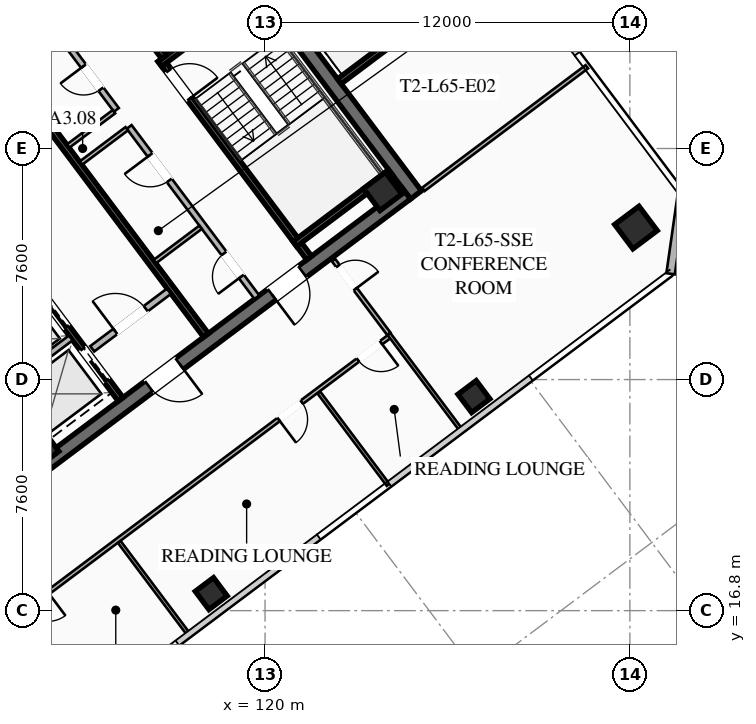
"""IFC4 building model, lengths in metres.
Left out: names, types, materials, properties, quantities, classifications, styles, units other than length and angle.
Written with IfcOpenShell. Run it as: python <this file> out.ifc"""

import sys

from ifc_helpers import new_model, si_unit, direction, frame, frame_2d, origin, origin_2d, place, context, subcontext, project, spatial, rectangle, hollow_rectangle, extrude, element, fill, save


model = new_model("IFC4")
c1 = context("Model", 3, precision=1e-05, world=origin(), true_north=direction((0.0, 1.0)))
c2 = subcontext(c1, "Body", "Model", "MODEL_VIEW")
j1 = project(units=[si_unit("LENGTHUNIT", "METRE"), si_unit("PLANEANGLEUNIT", "RADIAN")], contexts=[c1])
p1 = place(None, origin())
s1 = spatial("IfcSite", under=j1, at=p1, CompositionType="ELEMENT")
p2 = place(p1, origin())
s2 = spatial("IfcBuilding", under=s1, at=p2, CompositionType="ELEMENT")
p3 = place(p2, frame((0.0, 0.0, 239.7)))
s3 = spatial("IfcBuildingStorey", under=s2, at=p3, CompositionType="ELEMENT", Elevation=239.7)
p4 = place(p3, frame((115.604, 42.953, 0.0), z_axis=(0.0, 0.0, 1.0), x_axis=(0.600005007985, -0.799996243986, 0.0)))
e1 = element("IfcWall", 1, at=p4, inside=s3, PredefinedType="SHEAR", context=c2, shape_type="SweptSolid", body=[
    extrude(rectangle(XDim=15.6, YDim=0.45, at=frame_2d((7.8, 0.0))), origin(), (0.0, 0.0, 1.0), 3.55),
])
p5 = place(p3, frame((124.649, 30.518, 0.0), z_axis=(0.0, 0.0, 1.0), x_axis=(-0.8, -0.6, 0.0)))
e2 = element("IfcWall", 2, at=p5, inside=s3, PredefinedType="SHEAR", context=c2, shape_type="SweptSolid", body=[
    extrude(rectangle(XDim=15.26, YDim=0.45, at=frame_2d((7.63, 0.0))), origin(), (0.0, 0.0, 1.0), 3.55),
])
p6 = place(p5, frame((9.33, 0.0, 0.0)))
e3 = element("IfcOpeningElement", 3, at=p6, cuts=e2, PredefinedType="OPENING", context=c2, shape_type="SweptSolid", body=[
    extrude(rectangle(XDim=1.25, YDim=2.25, at=frame_2d((0.625, 1.125))), frame((0.0, 0.235, 0.0), z_axis=(0.0, -1.0, 0.0), x_axis=(1.0, 0.0, 0.0)), (0.0, 0.0, 1.0), 0.47),
])
p7 = place(p5, frame((4.28, 0.0, 0.0)))
e4 = element("IfcOpeningElement", 4, at=p7, cuts=e2, PredefinedType="OPENING", context=c2, shape_type="SweptSolid", body=[
    extrude(rectangle(XDim=1.25, YDim=2.25, at=frame_2d((0.625, 1.125))), frame((0.0, 0.235, 0.0), z_axis=(0.0, -1.0, 0.0), x_axis=(1.0, 0.0, 0.0)), (0.0, 0.0, 1.0), 0.47),
])
p8 = place(p3, frame((103.351, 33.482, 0.0), z_axis=(0.0, 0.0, 1.0), x_axis=(0.8, 0.6, 0.0)))
e5 = element("IfcWall", 5, at=p8, inside=s3, PredefinedType="SHEAR", context=c2, shape_type="SweptSolid", body=[
    extrude(rectangle(XDim=15.26, YDim=0.45, at=frame_2d((7.63, 0.0))), origin(), (0.0, 0.0, 1.0), 3.55),
])
p9 = place(p8, frame((4.68, 0.0, 0.0)))
e6 = element("IfcOpeningElement", 6, at=p9, cuts=e5, PredefinedType="OPENING", context=c2, shape_type="SweptSolid", body=[
    extrude(rectangle(XDim=1.25, YDim=2.25, at=frame_2d((0.625, 1.125))), frame((0.0, 0.235, 0.0), z_axis=(0.0, -1.0, 0.0), x_axis=(1.0, 0.0, 0.0)), (0.0, 0.0, 1.0), 0.47),
])
p10 = place(p8, frame((9.73, 0.0, 0.0)))
e7 = element("IfcOpeningElement", 7, at=p10, cuts=e5, PredefinedType="OPENING", context=c2, shape_type="SweptSolid", body=[
    extrude(rectangle(XDim=1.25, YDim=2.25, at=frame_2d((0.625, 1.125))), frame((0.0, 0.235, 0.0), z_axis=(0.0, -1.0, 0.0), x_axis=(1.0, 0.0, 0.0)), (0.0, 0.0, 1.0), 0.47),
])
for number, where, z_axis, x_axis in (
    (8, (112.59, 22.13, 0.0), (0.0, 0.0, 1.0), (0.8, 0.6, 0.0)),
    (9, (123.87, 30.59, 0.0), (0.0, 0.0, 1.0), (0.8, 0.6, 0.0)),
):
    element("IfcColumn", number, at=place(p3, frame(where, z_axis=z_axis, x_axis=x_axis)), inside=s3, PredefinedType="COLUMN", context=c2, shape_type="SweptSolid", body=[
        extrude(hollow_rectangle(XDim=0.9, YDim=0.9, WallThickness=0.04, at=origin_2d()), origin(), (0.0, 0.0, 1.0), 3.37),
    ])
p11 = place(p3, frame((132.2, 29.4, 0.0), z_axis=(0.0, 0.0, 1.0), x_axis=(0.799999996291, 0.600000004945, 0.0)))
e10 = element("IfcColumn", 10, at=p11, inside=s3, PredefinedType="COLUMN", context=c2, shape_type="SweptSolid", body=[
    extrude(hollow_rectangle(XDim=1.0, YDim=1.0, WallThickness=0.04, at=origin_2d()), origin(), (0.0, 0.0, 1.0), 3.37),
])
for number, where, z_axis, x_axis in (
    (11, (118.23, 17.36, 0.0), (0.0, 0.0, 1.0), (0.8, 0.6, 0.0)),
    (12, (126.87, 23.84, 0.0), (0.0, 0.0, 1.0), (0.8, 0.6, 0.0)),
):
    element("IfcColumn", number, at=place(p3, frame(where, z_axis=z_axis, x_axis=x_axis)), inside=s3, PredefinedType="COLUMN", context=c2, shape_type="SweptSolid", body=[
        extrude(hollow_rectangle(XDim=0.75, YDim=0.75, WallThickness=0.032, at=origin_2d()), origin(), (0.0, 0.0, 1.0), 3.37),
    ])
p12 = place(p3, frame((133.72, 30.54, 0.0), z_axis=(0.0, 0.0, 1.0), x_axis=(-0.141370477216, -0.989956760759, 0.0)))
e13 = element("IfcWall", 13, at=p12, inside=s3, PredefinedType="SOLIDWALL", context=c2, shape_type="SweptSolid", body=[
    extrude(rectangle(XDim=2.687, YDim=0.28, at=frame_2d((1.344, 0.0))), origin(), (0.0, 0.0, 1.0), 3.37),
])
p13 = place(p3, frame((116.56, 34.92, 0.0), z_axis=(0.0, 0.0, 1.0), x_axis=(0.59999041401, -0.800007189403, 0.0)))
e14 = element("IfcWall", 14, at=p13, inside=s3, PredefinedType="SHEAR", context=c2, shape_type="SweptSolid", body=[
    extrude(rectangle(XDim=8.15, YDim=0.2, at=frame_2d((4.075, 0.0))), origin(), (0.0, 0.0, 1.0), 3.37),
])
p14 = place(p13, frame((0.45, 0.0, 0.0)))
e15 = element("IfcOpeningElement", 15, at=p14, cuts=e14, PredefinedType="OPENING", context=c2, shape_type="SweptSolid", body=[
    extrude(rectangle(XDim=1.15, YDim=2.2, at=frame_2d((0.575, 1.1))), frame((0.0, 0.11, 0.0), z_axis=(0.0, -1.0, 0.0), x_axis=(1.0, 0.0, 0.0)), (0.0, 0.0, 1.0), 0.22),
])
for number, where, z_axis, x_axis in (
    (16, (116.54, 34.78, 0.0), (0.0, 0.0, 1.0), (0.8, 0.6, 0.0)),
    (17, (120.98, 28.86, 0.0), (0.0, 0.0, 1.0), (0.8, 0.6, 0.0)),
):
    element("IfcWall", number, at=place(p3, frame(where, z_axis=z_axis, x_axis=x_axis)), inside=s3, PredefinedType="SHEAR", context=c2, shape_type="SweptSolid", body=[
        extrude(rectangle(XDim=3.93, YDim=0.2, at=frame_2d((1.965, 0.0))), origin(), (0.0, 0.0, 1.0), 3.37),
    ])
p15 = place(p3, frame((118.058, 25.856, 0.0), z_axis=(0.0, 0.0, 1.0), x_axis=(-0.600002657301, 0.799998007018, 0.0)))
e18 = element("IfcWall", 18, at=p15, inside=s3, PredefinedType="SHEAR", context=c2, shape_type="SweptSolid", body=[
    extrude(rectangle(XDim=14.7, YDim=0.2, at=frame_2d((7.35, 0.0))), origin(), (0.0, 0.0, 1.0), 3.37),
])
p16 = place(p3, frame((114.316, 25.412, 0.0), z_axis=(0.0, 0.0, 1.0), x_axis=(0.800018601094, 0.59997519774, 0.0)))
e19 = element("IfcWall", 19, at=p16, inside=s3, PredefinedType="SOLIDWALL", context=c2, shape_type="SweptSolid", body=[
    extrude(rectangle(XDim=3.15, YDim=0.22, at=frame_2d((1.575, 0.0))), origin(), (0.0, 0.0, 1.0), 2.723),
])
p17 = place(p16, frame((0.95, 0.0, 0.0)))
e20 = element("IfcOpeningElement", 20, at=p17, cuts=e19, PredefinedType="OPENING", context=c2, shape_type="SweptSolid", body=[
    extrude(rectangle(XDim=1.25, YDim=2.25, at=frame_2d((0.625, 1.125))), frame((0.0, 0.12, 0.0), z_axis=(0.0, -1.0, 0.0), x_axis=(1.0, 0.0, 0.0)), (0.0, 0.0, 1.0), 0.24),
])
p18 = place(p3, frame((115.25, 23.75, 0.0), z_axis=(0.0, 0.0, 1.0), x_axis=(-0.599994036198, 0.800004472816, 0.0)))
e21 = element("IfcWall", 21, at=p18, inside=s3, PredefinedType="SHEAR", context=c2, shape_type="SweptSolid", body=[
    extrude(rectangle(XDim=6.55, YDim=0.2, at=frame_2d((3.275, 0.0))), origin(), (0.0, 0.0, 1.0), 3.37),
])
p19 = place(p18, frame((4.975, 0.0, 0.0)))
e22 = element("IfcOpeningElement", 22, at=p19, cuts=e21, PredefinedType="OPENING", context=c2, shape_type="SweptSolid", body=[
    extrude(rectangle(XDim=1.3, YDim=2.25, at=frame_2d((0.65, 1.125))), frame((0.0, 0.11, 0.0), z_axis=(0.0, -1.0, 0.0), x_axis=(1.0, 0.0, 0.0)), (0.0, 0.0, 1.0), 0.22),
])
p20 = place(p18, frame((2.975, 0.0, 0.0)))
e23 = element("IfcOpeningElement", 23, at=p20, cuts=e21, PredefinedType="OPENING", context=c2, shape_type="SweptSolid", body=[
    extrude(rectangle(XDim=1.3, YDim=2.25, at=frame_2d((0.65, 1.125))), frame((0.0, 0.11, 0.0), z_axis=(0.0, -1.0, 0.0), x_axis=(1.0, 0.0, 0.0)), (0.0, 0.0, 1.0), 0.22),
])
p21 = place(p18, frame((0.775, 0.0, 0.0)))
e24 = element("IfcOpeningElement", 24, at=p21, cuts=e21, PredefinedType="OPENING", context=c2, shape_type="SweptSolid", body=[
    extrude(rectangle(XDim=1.3, YDim=2.25, at=frame_2d((0.65, 1.125))), frame((0.0, 0.11, 0.0), z_axis=(0.0, -1.0, 0.0), x_axis=(1.0, 0.0, 0.0)), (0.0, 0.0, 1.0), 0.22),
])
p22 = place(p3, frame((110.746, 23.622, 0.0), z_axis=(0.0, 0.0, 1.0), x_axis=(0.800008183455, 0.599989088572, 0.0)))
e25 = element("IfcWall", 25, at=p22, inside=s3, PredefinedType="SOLIDWALL", context=c2, shape_type="SweptSolid", body=[
    extrude(rectangle(XDim=3.58, YDim=0.2, at=frame_2d((1.79, 0.0))), origin(), (0.0, 0.0, 1.0), 3.37),
])
p23 = place(p3, frame((112.75, 40.25, 0.0), z_axis=(0.0, 0.0, 1.0), x_axis=(0.599994036198, -0.800004472816, 0.0)))
e26 = element("IfcWall", 26, at=p23, inside=s3, PredefinedType="SHEAR", context=c2, shape_type="SweptSolid", body=[
    extrude(rectangle(XDim=6.55, YDim=0.2, at=frame_2d((3.275, 0.0))), origin(), (0.0, 0.0, 1.0), 3.37),
])
p24 = place(p23, frame((5.075, 0.0, 0.0)))
e27 = element("IfcOpeningElement", 27, at=p24, cuts=e26, PredefinedType="OPENING", context=c2, shape_type="SweptSolid", body=[
    extrude(rectangle(XDim=1.1, YDim=2.2, at=frame_2d((0.55, 1.1))), frame((0.0, 0.11, 0.0), z_axis=(0.0, -1.0, 0.0), x_axis=(1.0, 0.0, 0.0)), (0.0, 0.0, 1.0), 0.22),
])
p25 = place(p23, frame((3.025, 0.0, 0.0)))
e28 = element("IfcOpeningElement", 28, at=p25, cuts=e26, PredefinedType="OPENING", context=c2, shape_type="SweptSolid", body=[
    extrude(rectangle(XDim=1.1, YDim=2.2, at=frame_2d((0.55, 1.1))), frame((0.0, 0.11, 0.0), z_axis=(0.0, -1.0, 0.0), x_axis=(1.0, 0.0, 0.0)), (0.0, 0.0, 1.0), 0.22),
])
p26 = place(p23, frame((1.025, 0.0, 0.0)))
e29 = element("IfcOpeningElement", 29, at=p26, cuts=e26, PredefinedType="OPENING", context=c2, shape_type="SweptSolid", body=[
    extrude(rectangle(XDim=1.1, YDim=2.2, at=frame_2d((0.55, 1.1))), frame((0.0, 0.11, 0.0), z_axis=(0.0, -1.0, 0.0), x_axis=(1.0, 0.0, 0.0)), (0.0, 0.0, 1.0), 0.22),
])
p27 = place(p3, frame((119.73, 27.11, 0.0), z_axis=(0.0, 0.0, 1.0), x_axis=(-0.600005580459, 0.799995814625, 0.0)))
e30 = element("IfcWall", 30, at=p27, inside=s3, PredefinedType="SOLIDWALL", context=c2, shape_type="SweptSolid", body=[
    extrude(rectangle(XDim=7.0, YDim=0.2, at=frame_2d((3.5, 0.0))), origin(), (0.0, 0.0, 1.0), 2.723),
])
p28 = place(p27, frame((0.85, 0.0, 0.0)))
e31 = element("IfcOpeningElement", 31, at=p28, cuts=e30, PredefinedType="OPENING", context=c2, shape_type="SweptSolid", body=[
    extrude(rectangle(XDim=0.95, YDim=2.05, at=frame_2d((0.475, 1.025))), frame((0.0, 0.11, 0.0), z_axis=(0.0, -1.0, 0.0), x_axis=(1.0, 0.0, 0.0)), (0.0, 0.0, 1.0), 0.22),
])
p29 = place(p27, frame((4.8, 0.0, 0.0)))
e32 = element("IfcOpeningElement", 32, at=p29, cuts=e30, PredefinedType="OPENING", context=c2, shape_type="SweptSolid", body=[
    extrude(rectangle(XDim=1.05, YDim=2.2, at=frame_2d((0.525, 1.1))), frame((0.0, 0.11, 0.0), z_axis=(0.0, -1.0, 0.0), x_axis=(1.0, 0.0, 0.0)), (0.0, 0.0, 1.0), 0.22),
])
for number, where, z_axis, x_axis in (
    (33, (113.946, 31.522, 0.0), (0.0, 0.0, 1.0), (0.8, 0.6, 0.0)),
    (34, (116.376, 28.282, 0.0), (0.0, 0.0, 1.0), (0.8, 0.6, 0.0)),
):
    element("IfcWall", number, at=place(p3, frame(where, z_axis=z_axis, x_axis=x_axis)), inside=s3, PredefinedType="PARTITIONING", context=c2, shape_type="SweptSolid", body=[
        extrude(rectangle(XDim=1.88, YDim=0.135, at=frame_2d((0.94, 0.0))), origin(), (0.0, 0.0, 1.0), 2.723),
    ])
p30 = place(p3, frame((115.11, 33.27, 0.0), z_axis=(0.0, 0.0, 1.0), x_axis=(-0.600011160345, 0.79999162962, 0.0)))
e35 = element("IfcWall", 35, at=p30, inside=s3, PredefinedType="SOLIDWALL", context=c2, shape_type="SweptSolid", body=[
    extrude(rectangle(XDim=7.0, YDim=0.2, at=frame_2d((3.5, 0.0))), origin(), (0.0, 0.0, 1.0), 2.723),
])
p31 = place(p30, frame((0.85, 0.0, 0.0)))
e36 = element("IfcOpeningElement", 36, at=p31, cuts=e35, PredefinedType="OPENING", context=c2, shape_type="SweptSolid", body=[
    extrude(rectangle(XDim=0.95, YDim=2.05, at=frame_2d((0.475, 1.025))), frame((0.0, 0.11, 0.0), z_axis=(0.0, -1.0, 0.0), x_axis=(1.0, 0.0, 0.0)), (0.0, 0.0, 1.0), 0.22),
])
p32 = place(p30, frame((4.85, 0.0, 0.0)))
e37 = element("IfcOpeningElement", 37, at=p32, cuts=e35, PredefinedType="OPENING", context=c2, shape_type="SweptSolid", body=[
    extrude(rectangle(XDim=0.95, YDim=2.05, at=frame_2d((0.475, 1.025))), frame((0.0, 0.11, 0.0), z_axis=(0.0, -1.0, 0.0), x_axis=(1.0, 0.0, 0.0)), (0.0, 0.0, 1.0), 0.22),
])
p33 = place(p3, frame((113.526, 32.082, 0.0), z_axis=(0.0, 0.0, 1.0), x_axis=(0.800046745961, 0.599937666993, 0.0)))
e38 = element("IfcWall", 38, at=p33, inside=s3, PredefinedType="PARTITIONING", context=c2, shape_type="SweptSolid", body=[
    extrude(rectangle(XDim=1.88, YDim=0.135, at=frame_2d((0.94, 0.0))), origin(), (0.0, 0.0, 1.0), 2.723),
])
p34 = place(p3, frame((122.444, 34.208, 0.0), z_axis=(0.0, 0.0, 1.0), x_axis=(0.79999138319, 0.600011488909, 0.0)))
e39 = element("IfcWall", 39, at=p34, inside=s3, PredefinedType="SHEAR", context=c2, shape_type="SweptSolid", body=[
    extrude(rectangle(XDim=3.4, YDim=0.2, at=frame_2d((1.7, 0.0))), origin(), (0.0, 0.0, 1.0), 3.37),
])
p35 = place(p3, frame((98.93, 33.76, 0.0), z_axis=(0.0, 0.0, 1.0), x_axis=(0.8, 0.6, 0.0)))
e40 = element("IfcWall", 40, at=p35, inside=s3, PredefinedType="PARTITIONING", context=c2, shape_type="SweptSolid", body=[
    extrude(rectangle(XDim=23.85, YDim=0.135, at=frame_2d((11.925, 0.0))), origin(), (0.0, 0.0, 1.0), 2.723),
])
p36 = place(p35, frame((0.3, 0.0, 0.0)))
e41 = element("IfcOpeningElement", 41, at=p36, cuts=e40, PredefinedType="OPENING", context=c2, shape_type="SweptSolid", body=[
    extrude(rectangle(XDim=0.95, YDim=2.05, at=frame_2d((0.475, 1.025))), frame((0.0, 0.077, 0.0), z_axis=(0.0, -1.0, 0.0), x_axis=(1.0, 0.0, 0.0)), (0.0, 0.0, 1.0), 0.155),
])
p37 = place(p35, frame((10.779, 0.0, 0.0)))
e42 = element("IfcOpeningElement", 42, at=p37, cuts=e40, PredefinedType="OPENING", context=c2, shape_type="SweptSolid", body=[
    extrude(rectangle(XDim=0.95, YDim=2.05, at=frame_2d((0.475, 1.025))), frame((0.0, 0.077, 0.0), z_axis=(0.0, -1.0, 0.0), x_axis=(1.0, 0.0, 0.0)), (0.0, 0.0, 1.0), 0.155),
])
p38 = place(p35, frame((14.585, 0.0, 0.0)))
e43 = element("IfcOpeningElement", 43, at=p38, cuts=e40, PredefinedType="OPENING", context=c2, shape_type="SweptSolid", body=[
    extrude(rectangle(XDim=0.95, YDim=2.05, at=frame_2d((0.475, 1.025))), frame((0.0, 0.077, 0.0), z_axis=(0.0, -1.0, 0.0), x_axis=(1.0, 0.0, 0.0)), (0.0, 0.0, 1.0), 0.155),
])
p39 = place(p35, frame((22.6, 0.0, 0.0)))
e44 = element("IfcOpeningElement", 44, at=p39, cuts=e40, PredefinedType="OPENING", context=c2, shape_type="SweptSolid", body=[
    extrude(rectangle(XDim=0.95, YDim=2.05, at=frame_2d((0.475, 1.025))), frame((0.0, 0.077, 0.0), z_axis=(0.0, -1.0, 0.0), x_axis=(1.0, 0.0, 0.0)), (0.0, 0.0, 1.0), 0.155),
])
p40 = place(p3, frame((124.12, 25.84, 0.0), z_axis=(0.0, 0.0, 1.0), x_axis=(-0.800001902384, -0.599997463479, 0.0)))
e45 = element("IfcWall", 45, at=p40, inside=s3, PredefinedType="PARTITIONING", context=c2, shape_type="SweptSolid", body=[
    extrude(rectangle(XDim=15.4, YDim=0.135, at=frame_2d((7.7, 0.0))), origin(), (0.0, 0.0, 1.0), 2.723),
])
p41 = place(p40, frame((14.07, 0.0, 0.0)))
e46 = element("IfcOpeningElement", 46, at=p41, cuts=e45, PredefinedType="OPENING", context=c2, shape_type="SweptSolid", body=[
    extrude(rectangle(XDim=0.95, YDim=2.05, at=frame_2d((0.475, 1.025))), frame((0.0, 0.077, 0.0), z_axis=(0.0, -1.0, 0.0), x_axis=(1.0, 0.0, 0.0)), (0.0, 0.0, 1.0), 0.155),
])
p42 = place(p40, frame((3.64, 0.0, 0.0)))
e47 = element("IfcOpeningElement", 47, at=p42, cuts=e45, PredefinedType="OPENING", context=c2, shape_type="SweptSolid", body=[
    extrude(rectangle(XDim=0.95, YDim=2.05, at=frame_2d((0.475, 1.025))), frame((0.0, 0.077, 0.0), z_axis=(0.0, -1.0, 0.0), x_axis=(1.0, 0.0, 0.0)), (0.0, 0.0, 1.0), 0.155),
])
p43 = place(p40, frame((0.38, 0.0, 0.0)))
e48 = element("IfcOpeningElement", 48, at=p43, cuts=e45, PredefinedType="OPENING", context=c2, shape_type="SweptSolid", body=[
    extrude(rectangle(XDim=0.95, YDim=2.05, at=frame_2d((0.475, 1.025))), frame((0.0, 0.077, 0.0), z_axis=(0.0, -1.0, 0.0), x_axis=(1.0, 0.0, 0.0)), (0.0, 0.0, 1.0), 0.155),
])
p44 = place(p3, frame((122.248, 28.336, 0.0), z_axis=(0.0, 0.0, 1.0), x_axis=(0.600012849883, -0.799990362426, 0.0)))
e49 = element("IfcWall", 49, at=p44, inside=s3, PredefinedType="PARTITIONING", context=c2, shape_type="SweptSolid", body=[
    extrude(rectangle(XDim=3.04, YDim=0.135, at=frame_2d((1.52, 0.0))), origin(), (0.0, 0.0, 1.0), 2.723),
])
p45 = place(p44, frame((0.25, 0.0, 0.0)))
e50 = element("IfcOpeningElement", 50, at=p45, cuts=e49, PredefinedType="OPENING", context=c2, shape_type="SweptSolid", body=[
    extrude(rectangle(XDim=0.95, YDim=2.05, at=frame_2d((0.475, 1.025))), frame((0.0, 0.077, 0.0), z_axis=(0.0, -1.0, 0.0), x_axis=(1.0, 0.0, 0.0)), (0.0, 0.0, 1.0), 0.155),
])
p46 = place(p3, frame((117.488, 16.016, 0.0), z_axis=(0.0, 0.0, 1.0), x_axis=(-0.600030839559, 0.799976869402, 0.0)))
e51 = element("IfcWall", 51, at=p46, inside=s3, PredefinedType="PARTITIONING", context=c2, shape_type="SweptSolid", body=[
    extrude(rectangle(XDim=3.8, YDim=0.11, at=frame_2d((1.9, 0.0))), origin(), (0.0, 0.0, 1.0), 2.723),
])
p47 = place(p3, frame((124.048, 20.936, 0.0), z_axis=(0.0, 0.0, 1.0), x_axis=(-0.6, 0.8, 0.0)))
e52 = element("IfcWall", 52, at=p47, inside=s3, PredefinedType="PARTITIONING", context=c2, shape_type="SweptSolid", body=[
    extrude(rectangle(XDim=3.8, YDim=0.11, at=frame_2d((1.9, 0.0))), origin(), (0.0, 0.0, 1.0), 2.723),
])
p48 = place(p3, frame((126.448, 22.736, 0.0), z_axis=(0.0, 0.0, 1.0), x_axis=(-0.6, 0.8, 0.0)))
e53 = element("IfcWall", 53, at=p48, inside=s3, PredefinedType="PARTITIONING", context=c2, shape_type="SweptSolid", body=[
    extrude(rectangle(XDim=3.96, YDim=0.11, at=frame_2d((1.98, 0.0))), origin(), (0.0, 0.0, 1.0), 2.723),
])
p49 = place(p3, frame((125.208, 30.656, 0.0), z_axis=(0.0, 0.0, 1.0), x_axis=(0.8, 0.6, 0.0)))
e54 = element("IfcWall", 54, at=p49, inside=s3, PredefinedType="PARTITIONING", context=c2, shape_type="SweptSolid", body=[
    extrude(rectangle(XDim=6.72, YDim=0.135, at=frame_2d((3.36, 0.0))), origin(), (0.0, 0.0, 1.0), 2.723),
])
p50 = place(p6, origin())
e55 = element("IfcDoor", 55, at=p50, inside=s3, OperationType="SINGLE_SWING_LEFT", PredefinedType="DOOR", context=c2, shape_type="SweptSolid", body=[
    extrude(rectangle(XDim=1.25, YDim=2.25, at=frame_2d((0.625, 1.125))), frame((0.0, 0.025, 0.0), z_axis=(0.0, -1.0, 0.0), x_axis=(1.0, 0.0, 0.0)), (0.0, 0.0, 1.0), 0.05),
])
fill(e3, e55)
p51 = place(p7, origin())
e56 = element("IfcDoor", 56, at=p51, inside=s3, OperationType="SINGLE_SWING_RIGHT", PredefinedType="DOOR", context=c2, shape_type="SweptSolid", body=[
    extrude(rectangle(XDim=1.25, YDim=2.25, at=frame_2d((0.625, 1.125))), frame((0.0, 0.025, 0.0), z_axis=(0.0, -1.0, 0.0), x_axis=(1.0, 0.0, 0.0)), (0.0, 0.0, 1.0), 0.05),
])
fill(e4, e56)
p52 = place(p14, origin())
e57 = element("IfcDoor", 57, at=p52, inside=s3, OperationType="SINGLE_SWING_RIGHT", PredefinedType="DOOR", context=c2, shape_type="SweptSolid", body=[
    extrude(rectangle(XDim=1.15, YDim=2.2, at=frame_2d((0.575, 1.1))), frame((0.0, 0.025, 0.0), z_axis=(0.0, -1.0, 0.0), x_axis=(1.0, 0.0, 0.0)), (0.0, 0.0, 1.0), 0.05),
])
fill(e15, e57)
p53 = place(p17, origin())
e58 = element("IfcDoor", 58, at=p53, inside=s3, OperationType="SINGLE_SWING_LEFT", PredefinedType="DOOR", context=c2, shape_type="SweptSolid", body=[
    extrude(rectangle(XDim=1.25, YDim=2.25, at=frame_2d((0.625, 1.125))), frame((0.0, 0.025, 0.0), z_axis=(0.0, -1.0, 0.0), x_axis=(1.0, 0.0, 0.0)), (0.0, 0.0, 1.0), 0.05),
])
fill(e20, e58)
p54 = place(p28, origin())
e59 = element("IfcDoor", 59, at=p54, inside=s3, OperationType="SINGLE_SWING_LEFT", PredefinedType="DOOR", context=c2, shape_type="SweptSolid", body=[
    extrude(rectangle(XDim=0.95, YDim=2.05, at=frame_2d((0.475, 1.025))), frame((0.0, 0.025, 0.0), z_axis=(0.0, -1.0, 0.0), x_axis=(1.0, 0.0, 0.0)), (0.0, 0.0, 1.0), 0.05),
])
fill(e31, e59)
p55 = place(p29, origin())
e60 = element("IfcDoor", 60, at=p55, inside=s3, OperationType="SINGLE_SWING_RIGHT", PredefinedType="DOOR", context=c2, shape_type="SweptSolid", body=[
    extrude(rectangle(XDim=1.05, YDim=2.2, at=frame_2d((0.525, 1.1))), frame((0.0, 0.025, 0.0), z_axis=(0.0, -1.0, 0.0), x_axis=(1.0, 0.0, 0.0)), (0.0, 0.0, 1.0), 0.05),
])
fill(e32, e60)
p56 = place(p31, origin())
e61 = element("IfcDoor", 61, at=p56, inside=s3, OperationType="SINGLE_SWING_RIGHT", PredefinedType="DOOR", context=c2, shape_type="SweptSolid", body=[
    extrude(rectangle(XDim=0.95, YDim=2.05, at=frame_2d((0.475, 1.025))), frame((0.0, 0.025, 0.0), z_axis=(0.0, -1.0, 0.0), x_axis=(1.0, 0.0, 0.0)), (0.0, 0.0, 1.0), 0.05),
])
fill(e36, e61)
p57 = place(p42, origin())
e62 = element("IfcDoor", 62, at=p57, inside=s3, OperationType="SINGLE_SWING_RIGHT", PredefinedType="DOOR", context=c2, shape_type="SweptSolid", body=[
    extrude(rectangle(XDim=0.95, YDim=2.05, at=frame_2d((0.475, 1.025))), frame((0.0, 0.025, 0.0), z_axis=(0.0, -1.0, 0.0), x_axis=(1.0, 0.0, 0.0)), (0.0, 0.0, 1.0), 0.05),
])
fill(e47, e62)
p58 = place(p43, origin())
e63 = element("IfcDoor", 63, at=p58, inside=s3, OperationType="SINGLE_SWING_LEFT", PredefinedType="DOOR", context=c2, shape_type="SweptSolid", body=[
    extrude(rectangle(XDim=0.95, YDim=2.05, at=frame_2d((0.475, 1.025))), frame((0.0, 0.025, 0.0), z_axis=(0.0, -1.0, 0.0), x_axis=(1.0, 0.0, 0.0)), (0.0, 0.0, 1.0), 0.05),
])
fill(e48, e63)
p59 = place(p45, origin())
e64 = element("IfcDoor", 64, at=p59, inside=s3, OperationType="SINGLE_SWING_RIGHT", PredefinedType="DOOR", context=c2, shape_type="SweptSolid", body=[
    extrude(rectangle(XDim=0.95, YDim=2.05, at=frame_2d((0.475, 1.025))), frame((0.0, 0.025, 0.0), z_axis=(0.0, -1.0, 0.0), x_axis=(1.0, 0.0, 0.0)), (0.0, 0.0, 1.0), 0.05),
])
fill(e50, e64)
p60 = place(p20, origin())
e65 = element("IfcDoor", 65, at=p60, inside=s3, OperationType="SLIDING_TO_LEFT", PredefinedType="DOOR", context=c2, shape_type="SweptSolid", body=[
    extrude(rectangle(XDim=1.3, YDim=2.25, at=frame_2d((0.65, 1.125))), frame((0.0, 0.025, 0.0), z_axis=(0.0, -1.0, 0.0), x_axis=(1.0, 0.0, 0.0)), (0.0, 0.0, 1.0), 0.05),
])
fill(e23, e65)
p61 = place(p21, origin())
e66 = element("IfcDoor", 66, at=p61, inside=s3, OperationType="SLIDING_TO_LEFT", PredefinedType="DOOR", context=c2, shape_type="SweptSolid", body=[
    extrude(rectangle(XDim=1.3, YDim=2.25, at=frame_2d((0.65, 1.125))), frame((0.0, 0.025, 0.0), z_axis=(0.0, -1.0, 0.0), x_axis=(1.0, 0.0, 0.0)), (0.0, 0.0, 1.0), 0.05),
])
fill(e24, e66)
save(model, sys.argv[1])
